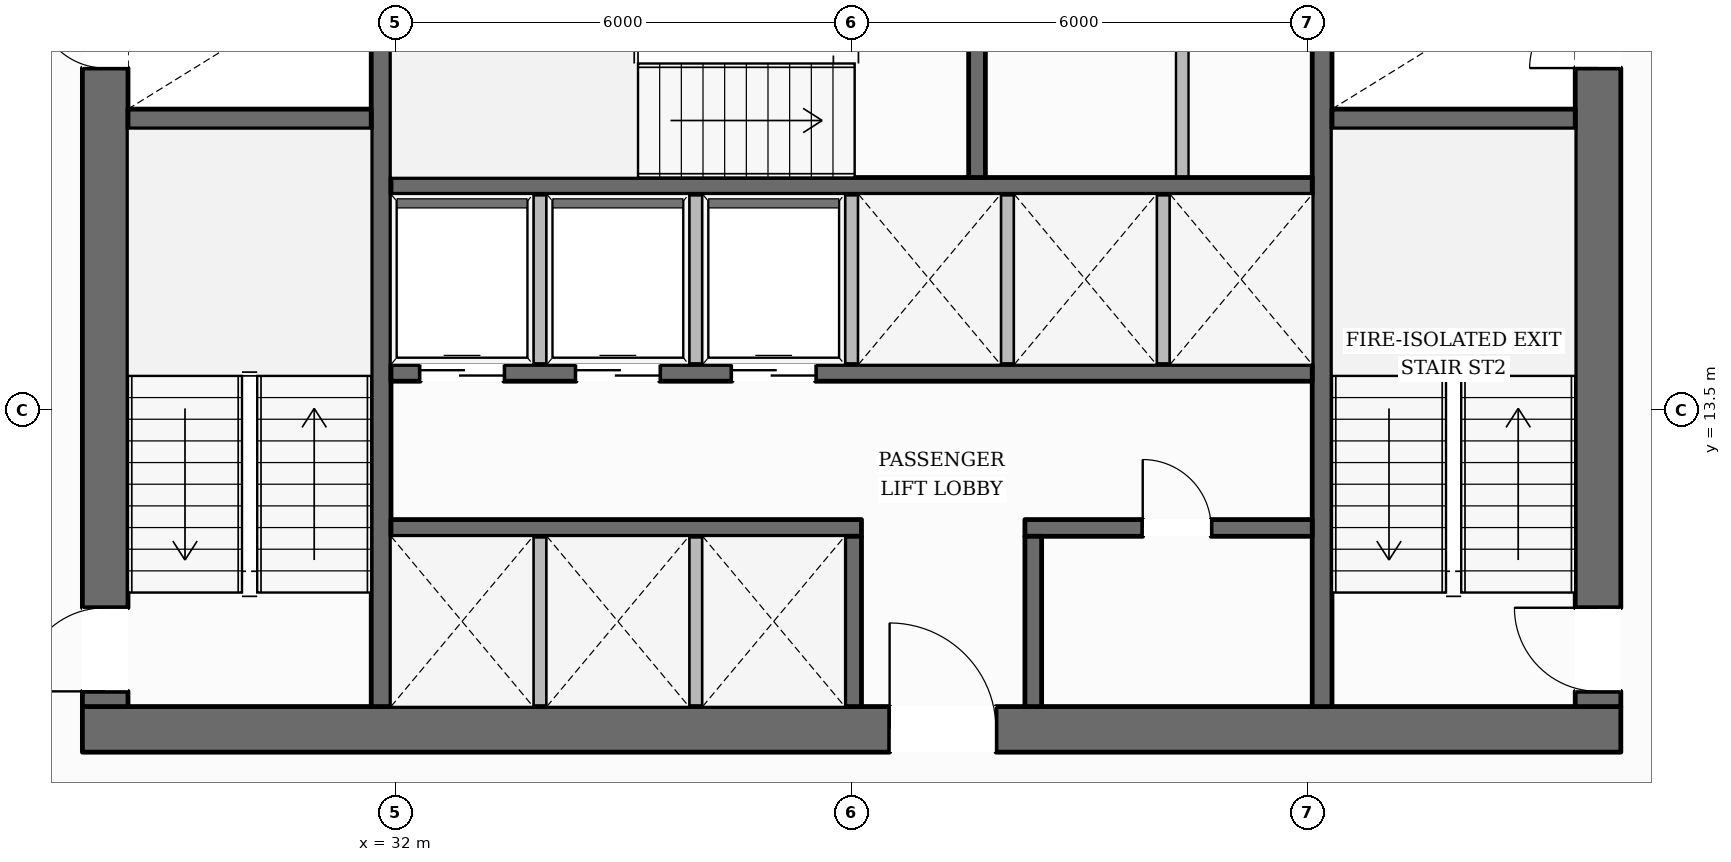
"""IFC4 building model, lengths in metres.
Left out: names, types, materials, properties, quantities, classifications, styles, units other than length and angle.
Written with IfcOpenShell. Run it as: python <this file> out.ifc"""

import sys

from ifc_helpers import new_model, si_unit, direction, frame, frame_2d, origin, place, context, subcontext, project, spatial, rectangle, extrude, element, fill, save


model = new_model("IFC4")
c1 = context("Model", 3, precision=1e-05, world=origin(), true_north=direction((0.0, 1.0)))
c2 = subcontext(c1, "Body", "Model", "MODEL_VIEW")
j1 = project(units=[si_unit("LENGTHUNIT", "METRE"), si_unit("PLANEANGLEUNIT", "RADIAN")], contexts=[c1])
p1 = place(None, origin())
s1 = spatial("IfcSite", under=j1, at=p1, CompositionType="ELEMENT")
p2 = place(p1, origin())
s2 = spatial("IfcBuilding", under=s1, at=p2, CompositionType="ELEMENT")
p3 = place(p2, frame((0.0, 0.0, 32.95)))
s3 = spatial("IfcBuildingStorey", under=s2, at=p3, CompositionType="ELEMENT", Elevation=32.95)
p4 = place(p3, frame((27.88, 9.3, 0.0), z_axis=(0.0, 0.0, 1.0), x_axis=(1.0, 0.0, 0.0)))
e1 = element("IfcWall", 1, at=p4, inside=s3, PredefinedType="SOLIDWALL", context=c2, shape_type="SweptSolid", body=[
    extrude(rectangle(XDim=20.24, YDim=0.6, at=frame_2d((10.12, 0.0))), origin(), (0.0, 0.0, 1.0), 3.59),
])
p5 = place(p4, frame((10.62, 0.0, 0.0)))
e2 = element("IfcOpeningElement", 2, at=p5, cuts=e1, PredefinedType="OPENING", context=c2, shape_type="SweptSolid", body=[
    extrude(rectangle(XDim=1.4, YDim=2.2, at=frame_2d((0.7, 1.1))), frame((0.0, 0.31, 0.0), z_axis=(0.0, -1.0, 0.0), x_axis=(1.0, 0.0, 0.0)), (0.0, 0.0, 1.0), 0.62),
])
p6 = place(p3, frame((28.18, 9.6, 0.0), z_axis=(0.0, 0.0, 1.0), x_axis=(0.0, 1.0, 0.0)))
e3 = element("IfcWall", 3, at=p6, inside=s3, PredefinedType="SOLIDWALL", context=c2, shape_type="SweptSolid", body=[
    extrude(rectangle(XDim=13.0, YDim=0.6, at=frame_2d((6.5, 0.0))), origin(), (0.0, 0.0, 1.0), 3.59),
])
p7 = place(p6, frame((0.2, 0.0, 0.0)))
e4 = element("IfcOpeningElement", 4, at=p7, cuts=e3, PredefinedType="OPENING", context=c2, shape_type="SweptSolid", body=[
    extrude(rectangle(XDim=1.1, YDim=2.15, at=frame_2d((0.55, 1.075))), frame((0.0, 0.31, 0.0), z_axis=(0.0, -1.0, 0.0), x_axis=(1.0, 0.0, 0.0)), (0.0, 0.0, 1.0), 0.62),
])
p8 = place(p6, frame((8.4, 0.0, 0.0)))
e5 = element("IfcOpeningElement", 5, at=p8, cuts=e3, PredefinedType="OPENING", context=c2, shape_type="SweptSolid", body=[
    extrude(rectangle(XDim=0.9, YDim=2.1, at=frame_2d((0.45, 1.05))), frame((0.0, 0.31, 0.0), z_axis=(0.0, -1.0, 0.0), x_axis=(1.0, 0.0, 0.0)), (0.0, 0.0, 1.0), 0.62),
])
p9 = place(p3, frame((47.82, 9.6, 0.0), z_axis=(0.0, 0.0, 1.0), x_axis=(0.0, 1.0, 0.0)))
e6 = element("IfcWall", 6, at=p9, inside=s3, PredefinedType="SOLIDWALL", context=c2, shape_type="SweptSolid", body=[
    extrude(rectangle(XDim=13.0, YDim=0.6, at=frame_2d((6.5, 0.0))), origin(), (0.0, 0.0, 1.0), 3.59),
])
p10 = place(p9, frame((0.2, 0.0, 0.0)))
e7 = element("IfcOpeningElement", 7, at=p10, cuts=e6, PredefinedType="OPENING", context=c2, shape_type="SweptSolid", body=[
    extrude(rectangle(XDim=1.1, YDim=2.15, at=frame_2d((0.55, 1.075))), frame((0.0, 0.31, 0.0), z_axis=(0.0, -1.0, 0.0), x_axis=(1.0, 0.0, 0.0)), (0.0, 0.0, 1.0), 0.62),
])
p11 = place(p9, frame((8.4, 0.0, 0.0)))
e8 = element("IfcOpeningElement", 8, at=p11, cuts=e6, PredefinedType="OPENING", context=c2, shape_type="SweptSolid", body=[
    extrude(rectangle(XDim=0.9, YDim=2.1, at=frame_2d((0.45, 1.05))), frame((0.0, 0.31, 0.0), z_axis=(0.0, -1.0, 0.0), x_axis=(1.0, 0.0, 0.0)), (0.0, 0.0, 1.0), 0.62),
])
p12 = place(p3, frame((31.81, 9.6, 0.0), z_axis=(0.0, 0.0, 1.0), x_axis=(0.0, 1.0, 0.0)))
e9 = element("IfcWall", 9, at=p12, inside=s3, PredefinedType="SHEAR", context=c2, shape_type="SweptSolid", body=[
    extrude(rectangle(XDim=13.0, YDim=0.26, at=frame_2d((6.5, 0.0))), origin(), (0.0, 0.0, 1.0), 3.59),
])
p13 = place(p12, frame((10.925, 0.0, 0.0)))
e10 = element("IfcOpeningElement", 10, at=p13, cuts=e9, PredefinedType="OPENING", context=c2, shape_type="SweptSolid", body=[
    extrude(rectangle(XDim=1.25, YDim=2.25, at=frame_2d((0.625, 1.125))), frame((0.0, 0.14, 0.0), z_axis=(0.0, -1.0, 0.0), x_axis=(1.0, 0.0, 0.0)), (0.0, 0.0, 1.0), 0.28),
])
p14 = place(p3, frame((44.19, 9.6, 0.0), z_axis=(0.0, 0.0, 1.0), x_axis=(0.0, 1.0, 0.0)))
e11 = element("IfcWall", 11, at=p14, inside=s3, PredefinedType="SHEAR", context=c2, shape_type="SweptSolid", body=[
    extrude(rectangle(XDim=13.0, YDim=0.26, at=frame_2d((6.5, 0.0))), origin(), (0.0, 0.0, 1.0), 3.59),
])
p15 = place(p14, frame((10.925, 0.0, 0.0)))
e12 = element("IfcOpeningElement", 12, at=p15, cuts=e11, PredefinedType="OPENING", context=c2, shape_type="SweptSolid", body=[
    extrude(rectangle(XDim=1.25, YDim=2.25, at=frame_2d((0.625, 1.125))), frame((0.0, 0.14, 0.0), z_axis=(0.0, -1.0, 0.0), x_axis=(1.0, 0.0, 0.0)), (0.0, 0.0, 1.0), 0.28),
])
for number, where, z_axis, x_axis in (
    (13, (28.48, 17.33, 0.0), (0.0, 0.0, 1.0), (1.0, 0.0, 0.0)),
    (14, (44.32, 17.33, 0.0), (0.0, 0.0, 1.0), (1.0, 0.0, 0.0)),
):
    element("IfcWall", number, at=place(p3, frame(where, z_axis=z_axis, x_axis=x_axis)), inside=s3, PredefinedType="SHEAR", context=c2, shape_type="SweptSolid", body=[
        extrude(rectangle(XDim=3.2, YDim=0.26, at=frame_2d((1.6, 0.0))), origin(), (0.0, 0.0, 1.0), 3.59),
    ])
p16 = place(p3, frame((31.94, 16.45, 0.0), z_axis=(0.0, 0.0, 1.0), x_axis=(1.0, 0.0, 0.0)))
e15 = element("IfcWall", 15, at=p16, inside=s3, PredefinedType="SOLIDWALL", context=c2, shape_type="SweptSolid", body=[
    extrude(rectangle(XDim=12.12, YDim=0.22, at=frame_2d((6.06, 0.0))), origin(), (0.0, 0.0, 1.0), 3.59),
])
p17 = place(p3, frame((39.65, 16.56, 0.0), z_axis=(0.0, 0.0, 1.0), x_axis=(0.0, 1.0, 0.0)))
e16 = element("IfcWall", 16, at=p17, inside=s3, PredefinedType="SOLIDWALL", context=c2, shape_type="SweptSolid", body=[
    extrude(rectangle(XDim=3.2, YDim=0.22, at=frame_2d((1.6, 0.0))), origin(), (0.0, 0.0, 1.0), 3.59),
])
p18 = place(p3, frame((31.94, 13.99, 0.0), z_axis=(0.0, 0.0, 1.0), x_axis=(1.0, 0.0, 0.0)))
e17 = element("IfcWall", 17, at=p18, inside=s3, PredefinedType="SOLIDWALL", context=c2, shape_type="SweptSolid", body=[
    extrude(rectangle(XDim=12.12, YDim=0.22, at=frame_2d((6.06, 0.0))), origin(), (0.0, 0.0, 1.0), 3.59),
])
p19 = place(p18, frame((0.385, 0.0, 0.0)))
e18 = element("IfcOpeningElement", 18, at=p19, cuts=e17, PredefinedType="OPENING", context=c2, shape_type="SweptSolid", body=[
    extrude(rectangle(XDim=1.1, YDim=2.2, at=frame_2d((0.55, 1.1))), frame((0.0, 0.12, 0.0), z_axis=(0.0, -1.0, 0.0), x_axis=(1.0, 0.0, 0.0)), (0.0, 0.0, 1.0), 0.24),
])
p20 = place(p18, frame((2.435, 0.0, 0.0)))
e19 = element("IfcOpeningElement", 19, at=p20, cuts=e17, PredefinedType="OPENING", context=c2, shape_type="SweptSolid", body=[
    extrude(rectangle(XDim=1.1, YDim=2.2, at=frame_2d((0.55, 1.1))), frame((0.0, 0.12, 0.0), z_axis=(0.0, -1.0, 0.0), x_axis=(1.0, 0.0, 0.0)), (0.0, 0.0, 1.0), 0.24),
])
p21 = place(p18, frame((4.485, 0.0, 0.0)))
e20 = element("IfcOpeningElement", 20, at=p21, cuts=e17, PredefinedType="OPENING", context=c2, shape_type="SweptSolid", body=[
    extrude(rectangle(XDim=1.1, YDim=2.2, at=frame_2d((0.55, 1.1))), frame((0.0, 0.12, 0.0), z_axis=(0.0, -1.0, 0.0), x_axis=(1.0, 0.0, 0.0)), (0.0, 0.0, 1.0), 0.24),
])
p22 = place(p3, frame((31.94, 11.95, 0.0), z_axis=(0.0, 0.0, 1.0), x_axis=(1.0, 0.0, 0.0)))
e21 = element("IfcWall", 21, at=p22, inside=s3, PredefinedType="SOLIDWALL", context=c2, shape_type="SweptSolid", body=[
    extrude(rectangle(XDim=6.19, YDim=0.22, at=frame_2d((3.095, 0.0))), origin(), (0.0, 0.0, 1.0), 3.59),
])
p23 = place(p3, frame((40.28, 11.95, 0.0), z_axis=(0.0, 0.0, 1.0), x_axis=(1.0, 0.0, 0.0)))
e22 = element("IfcWall", 22, at=p23, inside=s3, PredefinedType="SOLIDWALL", context=c2, shape_type="SweptSolid", body=[
    extrude(rectangle(XDim=3.78, YDim=0.22, at=frame_2d((1.89, 0.0))), origin(), (0.0, 0.0, 1.0), 3.59),
])
p24 = place(p23, frame((1.55, 0.0, 0.0)))
e23 = element("IfcOpeningElement", 23, at=p24, cuts=e22, PredefinedType="OPENING", context=c2, shape_type="SweptSolid", body=[
    extrude(rectangle(XDim=0.9, YDim=2.1, at=frame_2d((0.45, 1.05))), frame((0.0, 0.12, 0.0), z_axis=(0.0, -1.0, 0.0), x_axis=(1.0, 0.0, 0.0)), (0.0, 0.0, 1.0), 0.24),
])
for number, where, z_axis, x_axis in (
    (24, (38.02, 9.6, 0.0), (0.0, 0.0, 1.0), (0.0, 1.0, 0.0)),
    (25, (40.39, 9.6, 0.0), (0.0, 0.0, 1.0), (0.0, 1.0, 0.0)),
):
    element("IfcWall", number, at=place(p3, frame(where, z_axis=z_axis, x_axis=x_axis)), inside=s3, PredefinedType="SOLIDWALL", context=c2, shape_type="SweptSolid", body=[
        extrude(rectangle(XDim=2.24, YDim=0.22, at=frame_2d((1.12, 0.0))), origin(), (0.0, 0.0, 1.0), 3.59),
    ])
p25 = place(p3, frame((13.32, 14.856, 0.0), z_axis=(0.0, 0.0, 1.0), x_axis=(0.495031565758, 0.868874990378, 0.0)))
e26 = element("IfcWall", 26, at=p25, inside=s3, PredefinedType="STANDARD", context=c2, shape_type="SweptSolid", body=[
    extrude(rectangle(XDim=34.25, YDim=0.38, at=frame_2d((17.125, 0.0))), origin(), (0.0, 0.0, 1.0), 2.97),
])
p26 = place(p25, frame((25.087, 0.0, 0.0)))
e27 = element("IfcOpeningElement", 27, at=p26, cuts=e26, PredefinedType="OPENING", context=c2, shape_type="SweptSolid", body=[
    extrude(rectangle(XDim=1.0, YDim=2.2, at=frame_2d((0.5, 1.1))), frame((0.0, 0.2, 0.0), z_axis=(0.0, -1.0, 0.0), x_axis=(1.0, 0.0, 0.0)), (0.0, 0.0, 1.0), 0.4),
])
p27 = place(p25, frame((30.17, 0.0, 0.65)))
e28 = element("IfcOpeningElement", 28, at=p27, cuts=e26, PredefinedType="OPENING", context=c2, shape_type="SweptSolid", body=[
    extrude(rectangle(XDim=1.65, YDim=1.75, at=frame_2d((0.825, 0.875))), frame((0.0, 0.2, 0.0), z_axis=(0.0, -1.0, 0.0), x_axis=(1.0, 0.0, 0.0)), (0.0, 0.0, 1.0), 0.4),
])
p28 = place(p25, frame((7.973, 0.0, 0.65)))
e29 = element("IfcOpeningElement", 29, at=p28, cuts=e26, PredefinedType="OPENING", context=c2, shape_type="SweptSolid", body=[
    extrude(rectangle(XDim=1.65, YDim=1.75, at=frame_2d((0.825, 0.875))), frame((0.0, 0.2, 0.0), z_axis=(0.0, -1.0, 0.0), x_axis=(1.0, 0.0, 0.0)), (0.0, 0.0, 1.0), 0.4),
])
p29 = place(p25, frame((2.424, 0.0, 0.65)))
e30 = element("IfcOpeningElement", 30, at=p29, cuts=e26, PredefinedType="OPENING", context=c2, shape_type="SweptSolid", body=[
    extrude(rectangle(XDim=1.65, YDim=1.75, at=frame_2d((0.825, 0.875))), frame((0.0, 0.2, 0.0), z_axis=(0.0, -1.0, 0.0), x_axis=(1.0, 0.0, 0.0)), (0.0, 0.0, 1.0), 0.4),
])
p30 = place(p3, frame((45.788, 44.579, 0.0), z_axis=(0.0, 0.0, 1.0), x_axis=(0.49695855075, -0.867774278736, 0.0)))
e31 = element("IfcWall", 31, at=p30, inside=s3, PredefinedType="STANDARD", context=c2, shape_type="SweptSolid", body=[
    extrude(rectangle(XDim=34.379, YDim=0.38, at=frame_2d((17.189, 0.0))), origin(), (0.0, 0.0, 1.0), 2.97),
])
p31 = place(p30, frame((25.184, 0.0, 0.0)))
e32 = element("IfcOpeningElement", 32, at=p31, cuts=e31, PredefinedType="OPENING", context=c2, shape_type="SweptSolid", body=[
    extrude(rectangle(XDim=1.0, YDim=2.2, at=frame_2d((0.5, 1.1))), frame((0.0, 0.2, 0.0), z_axis=(0.0, -1.0, 0.0), x_axis=(1.0, 0.0, 0.0)), (0.0, 0.0, 1.0), 0.4),
])
p32 = place(p30, frame((30.294, 0.0, 0.65)))
e33 = element("IfcOpeningElement", 33, at=p32, cuts=e31, PredefinedType="OPENING", context=c2, shape_type="SweptSolid", body=[
    extrude(rectangle(XDim=1.65, YDim=1.75, at=frame_2d((0.825, 0.875))), frame((0.0, 0.2, 0.0), z_axis=(0.0, -1.0, 0.0), x_axis=(1.0, 0.0, 0.0)), (0.0, 0.0, 1.0), 0.4),
])
p33 = place(p30, frame((19.152, 0.0, 0.65)))
e34 = element("IfcOpeningElement", 34, at=p33, cuts=e31, PredefinedType="OPENING", context=c2, shape_type="SweptSolid", body=[
    extrude(rectangle(XDim=1.65, YDim=1.75, at=frame_2d((0.825, 0.875))), frame((0.0, 0.2, 0.0), z_axis=(0.0, -1.0, 0.0), x_axis=(1.0, 0.0, 0.0)), (0.0, 0.0, 1.0), 0.4),
])
p34 = place(p30, frame((8.01, 0.0, 0.65)))
e35 = element("IfcOpeningElement", 35, at=p34, cuts=e31, PredefinedType="OPENING", context=c2, shape_type="SweptSolid", body=[
    extrude(rectangle(XDim=1.65, YDim=1.75, at=frame_2d((0.825, 0.875))), frame((0.0, 0.2, 0.0), z_axis=(0.0, -1.0, 0.0), x_axis=(1.0, 0.0, 0.0)), (0.0, 0.0, 1.0), 0.4),
])
p35 = place(p30, frame((2.438, 0.0, 0.65)))
e36 = element("IfcOpeningElement", 36, at=p35, cuts=e31, PredefinedType="OPENING", context=c2, shape_type="SweptSolid", body=[
    extrude(rectangle(XDim=1.65, YDim=1.75, at=frame_2d((0.825, 0.875))), frame((0.0, 0.2, 0.0), z_axis=(0.0, -1.0, 0.0), x_axis=(1.0, 0.0, 0.0)), (0.0, 0.0, 1.0), 0.4),
])
for number, where, z_axis, x_axis in (
    (37, (33.9, 9.6, 0.0), (0.0, 0.0, 1.0), (0.0, 1.0, 0.0)),
    (38, (35.95, 9.6, 0.0), (0.0, 0.0, 1.0), (0.0, 1.0, 0.0)),
    (39, (33.9, 14.1, 0.0), (0.0, 0.0, 1.0), (0.0, 1.0, 0.0)),
    (40, (35.95, 14.1, 0.0), (0.0, 0.0, 1.0), (0.0, 1.0, 0.0)),
    (41, (38.0, 14.1, 0.0), (0.0, 0.0, 1.0), (0.0, 1.0, 0.0)),
    (42, (40.05, 14.1, 0.0), (0.0, 0.0, 1.0), (0.0, 1.0, 0.0)),
    (43, (42.1, 14.1, 0.0), (0.0, 0.0, 1.0), (0.0, 1.0, 0.0)),
):
    element("IfcWall", number, at=place(p3, frame(where, z_axis=z_axis, x_axis=x_axis)), inside=s3, PredefinedType="PARTITIONING", context=c2, shape_type="SweptSolid", body=[
        extrude(rectangle(XDim=2.24, YDim=0.165, at=frame_2d((1.12, 0.0))), origin(), (0.0, 0.0, 1.0), 3.59),
    ])
p36 = place(p3, frame((42.35, 16.56, 0.0), z_axis=(0.0, 0.0, 1.0), x_axis=(0.0, 1.0, 0.0)))
e44 = element("IfcWall", 44, at=p36, inside=s3, PredefinedType="PARTITIONING", context=c2, shape_type="SweptSolid", body=[
    extrude(rectangle(XDim=3.2, YDim=0.165, at=frame_2d((1.6, 0.0))), origin(), (0.0, 0.0, 1.0), 3.59),
])
p37 = place(p7, origin())
e45 = element("IfcDoor", 45, at=p37, inside=s3, OperationType="SINGLE_SWING_LEFT", PredefinedType="DOOR", context=c2, shape_type="SweptSolid", body=[
    extrude(rectangle(XDim=1.1, YDim=2.15, at=frame_2d((0.55, 1.075))), frame((0.0, 0.025, 0.0), z_axis=(0.0, -1.0, 0.0), x_axis=(1.0, 0.0, 0.0)), (0.0, 0.0, 1.0), 0.05),
])
fill(e4, e45)
p38 = place(p10, origin())
e46 = element("IfcDoor", 46, at=p38, inside=s3, OperationType="SINGLE_SWING_RIGHT", PredefinedType="DOOR", context=c2, shape_type="SweptSolid", body=[
    extrude(rectangle(XDim=1.1, YDim=2.15, at=frame_2d((0.55, 1.075))), frame((0.0, 0.025, 0.0), z_axis=(0.0, -1.0, 0.0), x_axis=(1.0, 0.0, 0.0)), (0.0, 0.0, 1.0), 0.05),
])
fill(e7, e46)
p39 = place(p8, origin())
e47 = element("IfcDoor", 47, at=p39, inside=s3, OperationType="SINGLE_SWING_RIGHT", PredefinedType="DOOR", context=c2, shape_type="SweptSolid", body=[
    extrude(rectangle(XDim=0.9, YDim=2.1, at=frame_2d((0.45, 1.05))), frame((0.0, 0.025, 0.0), z_axis=(0.0, -1.0, 0.0), x_axis=(1.0, 0.0, 0.0)), (0.0, 0.0, 1.0), 0.05),
])
fill(e5, e47)
p40 = place(p11, origin())
e48 = element("IfcDoor", 48, at=p40, inside=s3, OperationType="SINGLE_SWING_LEFT", PredefinedType="DOOR", context=c2, shape_type="SweptSolid", body=[
    extrude(rectangle(XDim=0.9, YDim=2.1, at=frame_2d((0.45, 1.05))), frame((0.0, 0.025, 0.0), z_axis=(0.0, -1.0, 0.0), x_axis=(1.0, 0.0, 0.0)), (0.0, 0.0, 1.0), 0.05),
])
fill(e8, e48)
p41 = place(p5, origin())
e49 = element("IfcDoor", 49, at=p41, inside=s3, OperationType="SINGLE_SWING_LEFT", PredefinedType="DOOR", context=c2, shape_type="SweptSolid", body=[
    extrude(rectangle(XDim=1.4, YDim=2.2, at=frame_2d((0.7, 1.1))), frame((0.0, 0.025, 0.0), z_axis=(0.0, -1.0, 0.0), x_axis=(1.0, 0.0, 0.0)), (0.0, 0.0, 1.0), 0.05),
])
fill(e2, e49)
p42 = place(p19, origin())
e50 = element("IfcDoor", 50, at=p42, inside=s3, OperationType="DOUBLE_DOOR_SLIDING", PredefinedType="DOOR", context=c2, shape_type="SweptSolid", body=[
    extrude(rectangle(XDim=1.1, YDim=2.2, at=frame_2d((0.55, 1.1))), frame((0.0, 0.025, 0.0), z_axis=(0.0, -1.0, 0.0), x_axis=(1.0, 0.0, 0.0)), (0.0, 0.0, 1.0), 0.05),
])
fill(e18, e50)
p43 = place(p20, origin())
e51 = element("IfcDoor", 51, at=p43, inside=s3, OperationType="DOUBLE_DOOR_SLIDING", PredefinedType="DOOR", context=c2, shape_type="SweptSolid", body=[
    extrude(rectangle(XDim=1.1, YDim=2.2, at=frame_2d((0.55, 1.1))), frame((0.0, 0.025, 0.0), z_axis=(0.0, -1.0, 0.0), x_axis=(1.0, 0.0, 0.0)), (0.0, 0.0, 1.0), 0.05),
])
fill(e19, e51)
p44 = place(p21, origin())
e52 = element("IfcDoor", 52, at=p44, inside=s3, OperationType="DOUBLE_DOOR_SLIDING", PredefinedType="DOOR", context=c2, shape_type="SweptSolid", body=[
    extrude(rectangle(XDim=1.1, YDim=2.2, at=frame_2d((0.55, 1.1))), frame((0.0, 0.025, 0.0), z_axis=(0.0, -1.0, 0.0), x_axis=(1.0, 0.0, 0.0)), (0.0, 0.0, 1.0), 0.05),
])
fill(e20, e52)
p45 = place(p24, origin())
e53 = element("IfcDoor", 53, at=p45, inside=s3, OperationType="SINGLE_SWING_LEFT", PredefinedType="DOOR", context=c2, shape_type="SweptSolid", body=[
    extrude(rectangle(XDim=0.9, YDim=2.1, at=frame_2d((0.45, 1.05))), frame((0.0, 0.025, 0.0), z_axis=(0.0, -1.0, 0.0), x_axis=(1.0, 0.0, 0.0)), (0.0, 0.0, 1.0), 0.05),
])
fill(e23, e53)
save(model, sys.argv[1])
